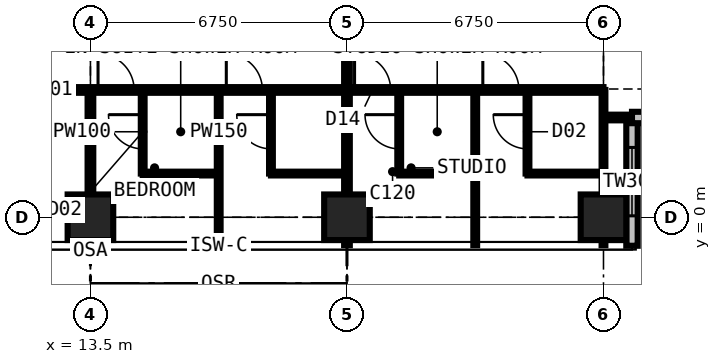
"""IFC4 building model, lengths in metres.
Left out: names, types, materials, properties, quantities, classifications, styles, units other than length and angle.
Written with IfcOpenShell. Run it as: python <this file> out.ifc"""

import sys

from ifc_helpers import new_model, si_unit, direction, frame, frame_2d, origin, origin_2d, place, context, subcontext, project, spatial, rectangle, extrude, element, fill, save


model = new_model("IFC4")
c1 = context("Model", 3, precision=1e-05, world=origin(), true_north=direction((0.0, 1.0)))
c2 = subcontext(c1, "Body", "Model", "MODEL_VIEW")
j1 = project(units=[si_unit("LENGTHUNIT", "METRE"), si_unit("PLANEANGLEUNIT", "RADIAN")], contexts=[c1])
p1 = place(None, origin())
s1 = spatial("IfcSite", under=j1, at=p1, CompositionType="ELEMENT")
p2 = place(p1, origin())
s2 = spatial("IfcBuilding", under=s1, at=p2, CompositionType="ELEMENT")
p3 = place(p2, frame((0.0, 0.0, 189.0)))
s3 = spatial("IfcBuildingStorey", under=s2, at=p3, CompositionType="ELEMENT", Elevation=189.0)
for number, where, z_axis, x_axis in (
    (1, (13.5, 0.0, 0.0), (0.0, 0.0, 1.0), (1.0, 0.0, 0.0)),
    (2, (20.25, 0.0, 0.0), (0.0, 0.0, 1.0), (1.0, 0.0, 0.0)),
    (3, (27.0, 0.0, 0.0), (0.0, 0.0, 1.0), (1.0, 0.0, 0.0)),
):
    element("IfcColumn", number, at=place(p3, frame(where, z_axis=z_axis, x_axis=x_axis)), inside=s3, PredefinedType="COLUMN", context=c2, shape_type="SweptSolid", body=[
        extrude(rectangle(XDim=1.2, YDim=1.2, at=origin_2d()), origin(), (0.0, 0.0, 1.0), 3.6),
    ])
p4 = place(p3, frame((27.75, -0.75, 0.0), z_axis=(0.0, 0.0, 1.0), x_axis=(0.0, 1.0, 0.0)))
e4 = element("IfcWall", 4, at=p4, inside=s3, PredefinedType="SOLIDWALL", context=c2, shape_type="SweptSolid", body=[
    extrude(rectangle(XDim=3.375, YDim=0.3, at=frame_2d((1.688, 0.0))), origin(), (0.0, 0.0, 1.0), 3.375),
])
p5 = place(p4, frame((0.788, 0.0, 0.6)))
e5 = element("IfcOpeningElement", 5, at=p5, cuts=e4, PredefinedType="OPENING", context=c2, shape_type="SweptSolid", body=[
    extrude(rectangle(XDim=1.8, YDim=2.1, at=frame_2d((0.9, 1.05))), frame((0.0, 0.16, 0.0), z_axis=(0.0, -1.0, 0.0), x_axis=(1.0, 0.0, 0.0)), (0.0, 0.0, 1.0), 0.32),
])
p6 = place(p3, frame((27.75, 2.625, 0.0), z_axis=(0.0, 0.0, 1.0), x_axis=(1.0, 0.0, 0.0)))
e6 = element("IfcWall", 6, at=p6, inside=s3, PredefinedType="SOLIDWALL", context=c2, shape_type="SweptSolid", body=[
    extrude(rectangle(XDim=3.375, YDim=0.3, at=frame_2d((1.688, 0.0))), origin(), (0.0, 0.0, 1.0), 3.375),
])
p7 = place(p6, frame((0.788, 0.0, 0.6)))
e7 = element("IfcOpeningElement", 7, at=p7, cuts=e6, PredefinedType="OPENING", context=c2, shape_type="SweptSolid", body=[
    extrude(rectangle(XDim=1.8, YDim=2.1, at=frame_2d((0.9, 1.05))), frame((0.0, 0.16, 0.0), z_axis=(0.0, -1.0, 0.0), x_axis=(1.0, 0.0, 0.0)), (0.0, 0.0, 1.0), 0.32),
])
p8 = place(p3, frame((6.75, 3.35, 0.0), z_axis=(0.0, 0.0, 1.0), x_axis=(1.0, 0.0, 0.0)))
e8 = element("IfcWall", 8, at=p8, inside=s3, PredefinedType="PARTITIONING", context=c2, shape_type="SweptSolid", body=[
    extrude(rectangle(XDim=20.25, YDim=0.15, at=frame_2d((10.125, 0.0))), origin(), (0.0, 0.0, 1.0), 3.375),
])
p9 = place(p8, frame((2.85, 0.0, 0.0)))
e9 = element("IfcOpeningElement", 9, at=p9, cuts=e8, PredefinedType="OPENING", context=c2, shape_type="SweptSolid", body=[
    extrude(rectangle(XDim=1.0, YDim=2.2, at=frame_2d((0.5, 1.1))), frame((0.0, 0.085, 0.0), z_axis=(0.0, -1.0, 0.0), x_axis=(1.0, 0.0, 0.0)), (0.0, 0.0, 1.0), 0.17),
])
p10 = place(p8, frame((6.95, 0.0, 0.0)))
e10 = element("IfcOpeningElement", 10, at=p10, cuts=e8, PredefinedType="OPENING", context=c2, shape_type="SweptSolid", body=[
    extrude(rectangle(XDim=0.95, YDim=2.2, at=frame_2d((0.475, 1.1))), frame((0.0, 0.085, 0.0), z_axis=(0.0, -1.0, 0.0), x_axis=(1.0, 0.0, 0.0)), (0.0, 0.0, 1.0), 0.17),
])
p11 = place(p8, frame((10.325, 0.0, 0.0)))
e11 = element("IfcOpeningElement", 11, at=p11, cuts=e8, PredefinedType="OPENING", context=c2, shape_type="SweptSolid", body=[
    extrude(rectangle(XDim=0.95, YDim=2.2, at=frame_2d((0.475, 1.1))), frame((0.0, 0.085, 0.0), z_axis=(0.0, -1.0, 0.0), x_axis=(1.0, 0.0, 0.0)), (0.0, 0.0, 1.0), 0.17),
])
p12 = place(p8, frame((13.7, 0.0, 0.0)))
e12 = element("IfcOpeningElement", 12, at=p12, cuts=e8, PredefinedType="OPENING", context=c2, shape_type="SweptSolid", body=[
    extrude(rectangle(XDim=0.95, YDim=2.2, at=frame_2d((0.475, 1.1))), frame((0.0, 0.085, 0.0), z_axis=(0.0, -1.0, 0.0), x_axis=(1.0, 0.0, 0.0)), (0.0, 0.0, 1.0), 0.17),
])
p13 = place(p8, frame((17.075, 0.0, 0.0)))
e13 = element("IfcOpeningElement", 13, at=p13, cuts=e8, PredefinedType="OPENING", context=c2, shape_type="SweptSolid", body=[
    extrude(rectangle(XDim=0.95, YDim=2.2, at=frame_2d((0.475, 1.1))), frame((0.0, 0.085, 0.0), z_axis=(0.0, -1.0, 0.0), x_axis=(1.0, 0.0, 0.0)), (0.0, 0.0, 1.0), 0.17),
])
p14 = place(p3, frame((13.5, -0.734, 0.0), z_axis=(0.0, 0.0, 1.0), x_axis=(0.0, 1.0, 0.0)))
e14 = element("IfcWall", 14, at=p14, inside=s3, PredefinedType="PARTITIONING", context=c2, shape_type="SweptSolid", body=[
    extrude(rectangle(XDim=4.084, YDim=0.15, at=frame_2d((2.042, 0.0))), origin(), (0.0, 0.0, 1.0), 2.61),
])
p15 = place(p3, frame((14.875, 1.15, 0.0), z_axis=(0.0, 0.0, 1.0), x_axis=(0.0, 1.0, 0.0)))
e15 = element("IfcWall", 15, at=p15, inside=s3, PredefinedType="PARTITIONING", context=c2, shape_type="SweptSolid", body=[
    extrude(rectangle(XDim=2.2, YDim=0.1, at=frame_2d((1.1, 0.0))), origin(), (0.0, 0.0, 1.0), 3.375),
])
p16 = place(p15, frame((0.65, 0.0, 0.0)))
e16 = element("IfcOpeningElement", 16, at=p16, cuts=e15, PredefinedType="OPENING", context=c2, shape_type="SweptSolid", body=[
    extrude(rectangle(XDim=0.9, YDim=2.2, at=frame_2d((0.45, 1.1))), frame((0.0, 0.06, 0.0), z_axis=(0.0, -1.0, 0.0), x_axis=(1.0, 0.0, 0.0)), (0.0, 0.0, 1.0), 0.12),
])
p17 = place(p3, frame((14.875, 1.15, 0.0), z_axis=(0.0, 0.0, 1.0), x_axis=(1.0, 0.0, 0.0)))
e17 = element("IfcWall", 17, at=p17, inside=s3, PredefinedType="PARTITIONING", context=c2, shape_type="SweptSolid", body=[
    extrude(rectangle(XDim=2.0, YDim=0.1, at=frame_2d((1.0, 0.0))), origin(), (0.0, 0.0, 1.0), 3.375),
])
p18 = place(p3, frame((16.875, -0.734, 0.0), z_axis=(0.0, 0.0, 1.0), x_axis=(0.0, 1.0, 0.0)))
e18 = element("IfcWall", 18, at=p18, inside=s3, PredefinedType="PARTITIONING", context=c2, shape_type="SweptSolid", body=[
    extrude(rectangle(XDim=4.084, YDim=0.1, at=frame_2d((2.042, 0.0))), origin(), (0.0, 0.0, 1.0), 3.375),
])
p19 = place(p3, frame((18.25, 1.15, 0.0), z_axis=(0.0, 0.0, 1.0), x_axis=(0.0, 1.0, 0.0)))
e19 = element("IfcWall", 19, at=p19, inside=s3, PredefinedType="PARTITIONING", context=c2, shape_type="SweptSolid", body=[
    extrude(rectangle(XDim=2.2, YDim=0.1, at=frame_2d((1.1, 0.0))), origin(), (0.0, 0.0, 1.0), 3.375),
])
p20 = place(p19, frame((0.65, 0.0, 0.0)))
e20 = element("IfcOpeningElement", 20, at=p20, cuts=e19, PredefinedType="OPENING", context=c2, shape_type="SweptSolid", body=[
    extrude(rectangle(XDim=0.9, YDim=2.2, at=frame_2d((0.45, 1.1))), frame((0.0, 0.06, 0.0), z_axis=(0.0, -1.0, 0.0), x_axis=(1.0, 0.0, 0.0)), (0.0, 0.0, 1.0), 0.12),
])
p21 = place(p3, frame((18.25, 1.15, 0.0), z_axis=(0.0, 0.0, 1.0), x_axis=(1.0, 0.0, 0.0)))
e21 = element("IfcWall", 21, at=p21, inside=s3, PredefinedType="PARTITIONING", context=c2, shape_type="SweptSolid", body=[
    extrude(rectangle(XDim=2.0, YDim=0.1, at=frame_2d((1.0, 0.0))), origin(), (0.0, 0.0, 1.0), 3.375),
])
p22 = place(p3, frame((20.25, -0.734, 0.0), z_axis=(0.0, 0.0, 1.0), x_axis=(0.0, 1.0, 0.0)))
e22 = element("IfcWall", 22, at=p22, inside=s3, PredefinedType="PARTITIONING", context=c2, shape_type="SweptSolid", body=[
    extrude(rectangle(XDim=12.034, YDim=0.15, at=frame_2d((6.017, 0.0))), origin(), (0.0, 0.0, 1.0), 2.61),
])
p23 = place(p3, frame((21.625, 1.15, 0.0), z_axis=(0.0, 0.0, 1.0), x_axis=(0.0, 1.0, 0.0)))
e23 = element("IfcWall", 23, at=p23, inside=s3, PredefinedType="PARTITIONING", context=c2, shape_type="SweptSolid", body=[
    extrude(rectangle(XDim=2.2, YDim=0.1, at=frame_2d((1.1, 0.0))), origin(), (0.0, 0.0, 1.0), 3.375),
])
p24 = place(p23, frame((0.65, 0.0, 0.0)))
e24 = element("IfcOpeningElement", 24, at=p24, cuts=e23, PredefinedType="OPENING", context=c2, shape_type="SweptSolid", body=[
    extrude(rectangle(XDim=0.9, YDim=2.2, at=frame_2d((0.45, 1.1))), frame((0.0, 0.06, 0.0), z_axis=(0.0, -1.0, 0.0), x_axis=(1.0, 0.0, 0.0)), (0.0, 0.0, 1.0), 0.12),
])
p25 = place(p3, frame((21.625, 1.15, 0.0), z_axis=(0.0, 0.0, 1.0), x_axis=(1.0, 0.0, 0.0)))
e25 = element("IfcWall", 25, at=p25, inside=s3, PredefinedType="PARTITIONING", context=c2, shape_type="SweptSolid", body=[
    extrude(rectangle(XDim=2.0, YDim=0.1, at=frame_2d((1.0, 0.0))), origin(), (0.0, 0.0, 1.0), 3.375),
])
p26 = place(p3, frame((23.625, -0.734, 0.0), z_axis=(0.0, 0.0, 1.0), x_axis=(0.0, 1.0, 0.0)))
e26 = element("IfcWall", 26, at=p26, inside=s3, PredefinedType="PARTITIONING", context=c2, shape_type="SweptSolid", body=[
    extrude(rectangle(XDim=4.084, YDim=0.1, at=frame_2d((2.042, 0.0))), origin(), (0.0, 0.0, 1.0), 3.375),
])
p27 = place(p3, frame((25.0, 1.15, 0.0), z_axis=(0.0, 0.0, 1.0), x_axis=(0.0, 1.0, 0.0)))
e27 = element("IfcWall", 27, at=p27, inside=s3, PredefinedType="PARTITIONING", context=c2, shape_type="SweptSolid", body=[
    extrude(rectangle(XDim=2.2, YDim=0.1, at=frame_2d((1.1, 0.0))), origin(), (0.0, 0.0, 1.0), 3.375),
])
p28 = place(p27, frame((0.65, 0.0, 0.0)))
e28 = element("IfcOpeningElement", 28, at=p28, cuts=e27, PredefinedType="OPENING", context=c2, shape_type="SweptSolid", body=[
    extrude(rectangle(XDim=0.9, YDim=2.2, at=frame_2d((0.45, 1.1))), frame((0.0, 0.06, 0.0), z_axis=(0.0, -1.0, 0.0), x_axis=(1.0, 0.0, 0.0)), (0.0, 0.0, 1.0), 0.12),
])
p29 = place(p3, frame((25.0, 1.15, 0.0), z_axis=(0.0, 0.0, 1.0), x_axis=(1.0, 0.0, 0.0)))
e29 = element("IfcWall", 29, at=p29, inside=s3, PredefinedType="PARTITIONING", context=c2, shape_type="SweptSolid", body=[
    extrude(rectangle(XDim=2.0, YDim=0.1, at=frame_2d((1.0, 0.0))), origin(), (0.0, 0.0, 1.0), 3.375),
])
p30 = place(p3, frame((27.0, -0.734, 0.0), z_axis=(0.0, 0.0, 1.0), x_axis=(0.0, 1.0, 0.0)))
e30 = element("IfcWall", 30, at=p30, inside=s3, PredefinedType="PARTITIONING", context=c2, shape_type="SweptSolid", body=[
    extrude(rectangle(XDim=4.084, YDim=0.1, at=frame_2d((2.042, 0.0))), origin(), (0.0, 0.0, 1.0), 2.877),
])
p31 = place(p3, frame((27.0, 2.625, 0.0), z_axis=(0.0, 0.0, 1.0), x_axis=(1.0, 0.0, 0.0)))
e31 = element("IfcWall", 31, at=p31, inside=s3, PredefinedType="PARTITIONING", context=c2, shape_type="SweptSolid", body=[
    extrude(rectangle(XDim=0.734, YDim=0.15, at=frame_2d((0.367, 0.0))), origin(), (0.0, 0.0, 1.0), 3.375),
])
p32 = place(p5, origin())
e32 = element("IfcWindow", 32, at=p32, inside=s3, PartitioningType="SINGLE_PANEL", PredefinedType="WINDOW", context=c2, shape_type="SweptSolid", body=[
    extrude(rectangle(XDim=1.8, YDim=2.1, at=frame_2d((0.9, 1.05))), frame((0.0, 0.03, 0.0), z_axis=(0.0, -1.0, 0.0), x_axis=(1.0, 0.0, 0.0)), (0.0, 0.0, 1.0), 0.06),
])
fill(e5, e32)
p33 = place(p10, origin())
e33 = element("IfcDoor", 33, at=p33, inside=s3, OperationType="SINGLE_SWING_LEFT", PredefinedType="DOOR", context=c2, shape_type="SweptSolid", body=[
    extrude(rectangle(XDim=0.95, YDim=2.2, at=frame_2d((0.475, 1.1))), frame((0.0, 0.025, 0.0), z_axis=(0.0, -1.0, 0.0), x_axis=(1.0, 0.0, 0.0)), (0.0, 0.0, 1.0), 0.05),
])
fill(e10, e33)
p34 = place(p16, origin())
e34 = element("IfcDoor", 34, at=p34, inside=s3, OperationType="SINGLE_SWING_RIGHT", PredefinedType="DOOR", context=c2, shape_type="SweptSolid", body=[
    extrude(rectangle(XDim=0.9, YDim=2.2, at=frame_2d((0.45, 1.1))), frame((0.0, 0.025, 0.0), z_axis=(0.0, -1.0, 0.0), x_axis=(1.0, 0.0, 0.0)), (0.0, 0.0, 1.0), 0.05),
])
fill(e16, e34)
p35 = place(p11, origin())
e35 = element("IfcDoor", 35, at=p35, inside=s3, OperationType="SINGLE_SWING_LEFT", PredefinedType="DOOR", context=c2, shape_type="SweptSolid", body=[
    extrude(rectangle(XDim=0.95, YDim=2.2, at=frame_2d((0.475, 1.1))), frame((0.0, 0.025, 0.0), z_axis=(0.0, -1.0, 0.0), x_axis=(1.0, 0.0, 0.0)), (0.0, 0.0, 1.0), 0.05),
])
fill(e11, e35)
p36 = place(p20, origin())
e36 = element("IfcDoor", 36, at=p36, inside=s3, OperationType="SINGLE_SWING_RIGHT", PredefinedType="DOOR", context=c2, shape_type="SweptSolid", body=[
    extrude(rectangle(XDim=0.9, YDim=2.2, at=frame_2d((0.45, 1.1))), frame((0.0, 0.025, 0.0), z_axis=(0.0, -1.0, 0.0), x_axis=(1.0, 0.0, 0.0)), (0.0, 0.0, 1.0), 0.05),
])
fill(e20, e36)
p37 = place(p12, origin())
e37 = element("IfcDoor", 37, at=p37, inside=s3, OperationType="SINGLE_SWING_LEFT", PredefinedType="DOOR", context=c2, shape_type="SweptSolid", body=[
    extrude(rectangle(XDim=0.95, YDim=2.2, at=frame_2d((0.475, 1.1))), frame((0.0, 0.025, 0.0), z_axis=(0.0, -1.0, 0.0), x_axis=(1.0, 0.0, 0.0)), (0.0, 0.0, 1.0), 0.05),
])
fill(e12, e37)
p38 = place(p24, origin())
e38 = element("IfcDoor", 38, at=p38, inside=s3, OperationType="SINGLE_SWING_RIGHT", PredefinedType="DOOR", context=c2, shape_type="SweptSolid", body=[
    extrude(rectangle(XDim=0.9, YDim=2.2, at=frame_2d((0.45, 1.1))), frame((0.0, 0.025, 0.0), z_axis=(0.0, -1.0, 0.0), x_axis=(1.0, 0.0, 0.0)), (0.0, 0.0, 1.0), 0.05),
])
fill(e24, e38)
p39 = place(p13, origin())
e39 = element("IfcDoor", 39, at=p39, inside=s3, OperationType="SINGLE_SWING_LEFT", PredefinedType="DOOR", context=c2, shape_type="SweptSolid", body=[
    extrude(rectangle(XDim=0.95, YDim=2.2, at=frame_2d((0.475, 1.1))), frame((0.0, 0.025, 0.0), z_axis=(0.0, -1.0, 0.0), x_axis=(1.0, 0.0, 0.0)), (0.0, 0.0, 1.0), 0.05),
])
fill(e13, e39)
p40 = place(p28, origin())
e40 = element("IfcDoor", 40, at=p40, inside=s3, OperationType="SINGLE_SWING_RIGHT", PredefinedType="DOOR", context=c2, shape_type="SweptSolid", body=[
    extrude(rectangle(XDim=0.9, YDim=2.2, at=frame_2d((0.45, 1.1))), frame((0.0, 0.025, 0.0), z_axis=(0.0, -1.0, 0.0), x_axis=(1.0, 0.0, 0.0)), (0.0, 0.0, 1.0), 0.05),
])
fill(e28, e40)
save(model, sys.argv[1])
